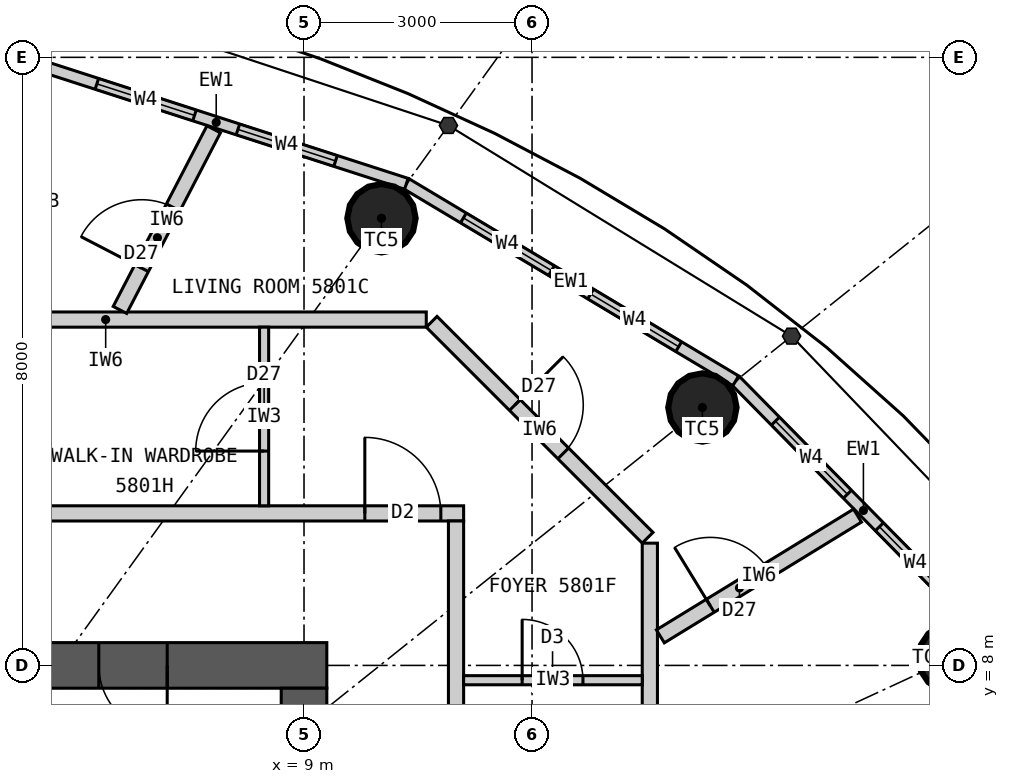
"""IFC4 building model, lengths in metres.
Left out: names, types, materials, properties, quantities, classifications, styles, units other than length and angle.
Written with IfcOpenShell. Run it as: python <this file> out.ifc"""

import sys

from ifc_helpers import new_model, si_unit, direction, frame, frame_2d, origin, origin_2d, place, context, subcontext, project, spatial, rectangle, circle, extrude, element, fill, save


model = new_model("IFC4")
c1 = context("Model", 3, precision=1e-05, world=origin(), true_north=direction((0.0, 1.0)))
c2 = subcontext(c1, "Body", "Model", "MODEL_VIEW")
j1 = project(units=[si_unit("LENGTHUNIT", "METRE"), si_unit("PLANEANGLEUNIT", "RADIAN")], contexts=[c1])
p1 = place(None, origin())
s1 = spatial("IfcSite", under=j1, at=p1, CompositionType="ELEMENT")
p2 = place(p1, origin())
s2 = spatial("IfcBuilding", under=s1, at=p2, CompositionType="ELEMENT")
p3 = place(p2, frame((0.0, 0.0, 216.0)))
s3 = spatial("IfcBuildingStorey", under=s2, at=p3, CompositionType="ELEMENT", Elevation=216.0)
for number, where, z_axis, x_axis in (
    (1, (17.532, 8.098, 0.0), (0.0, 0.0, 1.0), (1.0, 0.0, 0.0)),
    (2, (14.241, 11.393, 0.0), (0.0, 0.0, 1.0), (1.0, 0.0, 0.0)),
    (3, (10.019, 13.883, 0.0), (0.0, 0.0, 1.0), (1.0, 0.0, 0.0)),
):
    element("IfcColumn", number, at=place(p3, frame(where, z_axis=z_axis, x_axis=x_axis)), inside=s3, PredefinedType="COLUMN", context=c2, shape_type="SweptSolid", body=[
        extrude(circle(Radius=0.45, at=origin_2d()), origin(), (0.0, 0.0, 1.0), 3.3),
    ])
p4 = place(p3, frame((-9.3, 8.0, 0.0), z_axis=(0.0, 0.0, 1.0), x_axis=(1.0, 0.0, 0.0)))
e4 = element("IfcWall", 4, at=p4, inside=s3, PredefinedType="SHEAR", context=c2, shape_type="SweptSolid", body=[
    extrude(rectangle(XDim=18.6, YDim=0.6, at=frame_2d((9.3, 0.0))), origin(), (0.0, 0.0, 1.0), 3.3),
])
p5 = place(p4, frame((8.0, 0.0, 0.0)))
e5 = element("IfcOpeningElement", 5, at=p5, cuts=e4, PredefinedType="OPENING", context=c2, shape_type="SweptSolid", body=[
    extrude(rectangle(XDim=1.2, YDim=2.2, at=frame_2d((0.6, 1.1))), frame((0.0, 0.31, 0.0), z_axis=(0.0, -1.0, 0.0), x_axis=(1.0, 0.0, 0.0)), (0.0, 0.0, 1.0), 0.62),
])
p6 = place(p4, frame((15.6, 0.0, 0.0)))
e6 = element("IfcOpeningElement", 6, at=p6, cuts=e4, PredefinedType="OPENING", context=c2, shape_type="SweptSolid", body=[
    extrude(rectangle(XDim=0.9, YDim=2.2, at=frame_2d((0.45, 1.1))), frame((0.0, 0.31, 0.0), z_axis=(0.0, -1.0, 0.0), x_axis=(1.0, 0.0, 0.0)), (0.0, 0.0, 1.0), 0.62),
])
p7 = place(p3, frame((9.0, -7.7, 0.0), z_axis=(0.0, 0.0, 1.0), x_axis=(0.0, 1.0, 0.0)))
e7 = element("IfcWall", 7, at=p7, inside=s3, PredefinedType="SHEAR", context=c2, shape_type="SweptSolid", body=[
    extrude(rectangle(XDim=15.4, YDim=0.6, at=frame_2d((7.7, 0.0))), origin(), (0.0, 0.0, 1.0), 3.3),
])
p8 = place(p7, frame((6.8, 0.0, 0.0)))
e8 = element("IfcOpeningElement", 8, at=p8, cuts=e7, PredefinedType="OPENING", context=c2, shape_type="SweptSolid", body=[
    extrude(rectangle(XDim=1.8, YDim=2.2, at=frame_2d((0.9, 1.1))), frame((0.0, 0.31, 0.0), z_axis=(0.0, -1.0, 0.0), x_axis=(1.0, 0.0, 0.0)), (0.0, 0.0, 1.0), 0.62),
])
p9 = place(p3, frame((18.04, 8.332, 0.0), z_axis=(0.0, 0.0, 1.0), x_axis=(-0.701527379618, 0.712642501993, 0.0)))
e9 = element("IfcWall", 9, at=p9, inside=s3, PredefinedType="ELEMENTEDWALL", context=c2, shape_type="SweptSolid", body=[
    extrude(rectangle(XDim=4.788, YDim=0.15, at=frame_2d((2.394, 0.0))), origin(), (0.0, 0.0, 1.0), 3.12),
])
p10 = place(p9, frame((0.744, 0.0, 0.9)))
e10 = element("IfcOpeningElement", 10, at=p10, cuts=e9, PredefinedType="OPENING", context=c2, shape_type="SweptSolid", body=[
    extrude(rectangle(XDim=1.35, YDim=1.9, at=frame_2d((0.675, 0.95))), frame((0.0, 0.085, 0.0), z_axis=(0.0, -1.0, 0.0), x_axis=(1.0, 0.0, 0.0)), (0.0, 0.0, 1.0), 0.17),
])
p11 = place(p9, frame((2.694, 0.0, 0.9)))
e11 = element("IfcOpeningElement", 11, at=p11, cuts=e9, PredefinedType="OPENING", context=c2, shape_type="SweptSolid", body=[
    extrude(rectangle(XDim=1.35, YDim=1.9, at=frame_2d((0.675, 0.95))), frame((0.0, 0.085, 0.0), z_axis=(0.0, -1.0, 0.0), x_axis=(1.0, 0.0, 0.0)), (0.0, 0.0, 1.0), 0.17),
])
p12 = place(p3, frame((14.68, 11.744, 0.0), z_axis=(0.0, 0.0, 1.0), x_axis=(-0.85822150553, 0.513279502265, 0.0)))
e12 = element("IfcWall", 12, at=p12, inside=s3, PredefinedType="ELEMENTEDWALL", context=c2, shape_type="SweptSolid", body=[
    extrude(rectangle(XDim=5.05, YDim=0.15, at=frame_2d((2.525, 0.0))), origin(), (0.0, 0.0, 1.0), 3.12),
])
p13 = place(p12, frame((0.875, 0.0, 0.9)))
e13 = element("IfcOpeningElement", 13, at=p13, cuts=e12, PredefinedType="OPENING", context=c2, shape_type="SweptSolid", body=[
    extrude(rectangle(XDim=1.35, YDim=1.9, at=frame_2d((0.675, 0.95))), frame((0.0, 0.085, 0.0), z_axis=(0.0, -1.0, 0.0), x_axis=(1.0, 0.0, 0.0)), (0.0, 0.0, 1.0), 0.17),
])
p14 = place(p12, frame((2.825, 0.0, 0.9)))
e14 = element("IfcOpeningElement", 14, at=p14, cuts=e12, PredefinedType="OPENING", context=c2, shape_type="SweptSolid", body=[
    extrude(rectangle(XDim=1.35, YDim=1.9, at=frame_2d((0.675, 0.95))), frame((0.0, 0.085, 0.0), z_axis=(0.0, -1.0, 0.0), x_axis=(1.0, 0.0, 0.0)), (0.0, 0.0, 1.0), 0.17),
])
p15 = place(p3, frame((10.346, 14.336, 0.0), z_axis=(0.0, 0.0, 1.0), x_axis=(-0.951644702515, 0.307200846638, 0.0)))
e15 = element("IfcWall", 15, at=p15, inside=s3, PredefinedType="ELEMENTEDWALL", context=c2, shape_type="SweptSolid", body=[
    extrude(rectangle(XDim=5.258, YDim=0.15, at=frame_2d((2.629, 0.0))), origin(), (0.0, 0.0, 1.0), 3.12),
])
p16 = place(p15, frame((0.979, 0.0, 0.9)))
e16 = element("IfcOpeningElement", 16, at=p16, cuts=e15, PredefinedType="OPENING", context=c2, shape_type="SweptSolid", body=[
    extrude(rectangle(XDim=1.35, YDim=1.9, at=frame_2d((0.675, 0.95))), frame((0.0, 0.085, 0.0), z_axis=(0.0, -1.0, 0.0), x_axis=(1.0, 0.0, 0.0)), (0.0, 0.0, 1.0), 0.17),
])
p17 = place(p15, frame((2.929, 0.0, 0.9)))
e17 = element("IfcOpeningElement", 17, at=p17, cuts=e15, PredefinedType="OPENING", context=c2, shape_type="SweptSolid", body=[
    extrude(rectangle(XDim=1.35, YDim=1.9, at=frame_2d((0.675, 0.95))), frame((0.0, 0.085, 0.0), z_axis=(0.0, -1.0, 0.0), x_axis=(1.0, 0.0, 0.0)), (0.0, 0.0, 1.0), 0.17),
])
p18 = place(p3, frame((-11.1, 10.0, 0.0), z_axis=(0.0, 0.0, 1.0), x_axis=(1.0, 0.0, 0.0)))
e18 = element("IfcWall", 18, at=p18, inside=s3, PredefinedType="PARTITIONING", context=c2, shape_type="SweptSolid", body=[
    extrude(rectangle(XDim=22.2, YDim=0.2, at=frame_2d((11.1, 0.0))), origin(), (0.0, 0.0, 1.0), 3.12),
])
p19 = place(p18, frame((20.9, 0.0, 0.0)))
e19 = element("IfcOpeningElement", 19, at=p19, cuts=e18, PredefinedType="OPENING", context=c2, shape_type="SweptSolid", body=[
    extrude(rectangle(XDim=1.0, YDim=2.2, at=frame_2d((0.5, 1.1))), frame((0.0, 0.11, 0.0), z_axis=(0.0, -1.0, 0.0), x_axis=(1.0, 0.0, 0.0)), (0.0, 0.0, 1.0), 0.22),
])
p20 = place(p18, frame((2.82, 0.0, 0.0)))
e20 = element("IfcOpeningElement", 20, at=p20, cuts=e18, PredefinedType="OPENING", context=c2, shape_type="SweptSolid", body=[
    extrude(rectangle(XDim=1.0, YDim=2.2, at=frame_2d((0.5, 1.1))), frame((0.0, 0.11, 0.0), z_axis=(0.0, -1.0, 0.0), x_axis=(1.0, 0.0, 0.0)), (0.0, 0.0, 1.0), 0.22),
])
p21 = place(p3, frame((11.0, -0.464, 0.0), z_axis=(0.0, 0.0, 1.0), x_axis=(0.0, 1.0, 0.0)))
e21 = element("IfcWall", 21, at=p21, inside=s3, PredefinedType="PARTITIONING", context=c2, shape_type="SweptSolid", body=[
    extrude(rectangle(XDim=10.364, YDim=0.2, at=frame_2d((5.182, 0.0))), origin(), (0.0, 0.0, 1.0), 3.12),
])
p22 = place(p3, frame((13.55, 4.6, 0.0), z_axis=(0.0, 0.0, 1.0), x_axis=(0.0, 1.0, 0.0)))
e22 = element("IfcWall", 22, at=p22, inside=s3, PredefinedType="PARTITIONING", context=c2, shape_type="SweptSolid", body=[
    extrude(rectangle(XDim=5.009, YDim=0.2, at=frame_2d((2.504, 0.0))), origin(), (0.0, 0.0, 1.0), 3.12),
])
p23 = place(p22, frame((0.724, 0.0, 0.0)))
e23 = element("IfcOpeningElement", 23, at=p23, cuts=e22, PredefinedType="OPENING", context=c2, shape_type="SweptSolid", body=[
    extrude(rectangle(XDim=0.8, YDim=2.1, at=frame_2d((0.4, 1.05))), frame((0.0, 0.11, 0.0), z_axis=(0.0, -1.0, 0.0), x_axis=(1.0, 0.0, 0.0)), (0.0, 0.0, 1.0), 0.22),
])
p24 = place(p3, frame((13.521, 9.679, 0.0), z_axis=(0.0, 0.0, 1.0), x_axis=(-0.707106781187, 0.707106781187, 0.0)))
e24 = element("IfcWall", 24, at=p24, inside=s3, PredefinedType="PARTITIONING", context=c2, shape_type="SweptSolid", body=[
    extrude(rectangle(XDim=4.019, YDim=0.2, at=frame_2d((2.009, 0.0))), origin(), (0.0, 0.0, 1.0), 3.12),
])
p25 = place(p24, frame((1.57, 0.0, 0.0)))
e25 = element("IfcOpeningElement", 25, at=p25, cuts=e24, PredefinedType="OPENING", context=c2, shape_type="SweptSolid", body=[
    extrude(rectangle(XDim=0.9, YDim=2.1, at=frame_2d((0.45, 1.05))), frame((0.0, 0.11, 0.0), z_axis=(0.0, -1.0, 0.0), x_axis=(1.0, 0.0, 0.0)), (0.0, 0.0, 1.0), 0.22),
])
p26 = place(p3, frame((10.609, 12.55, 0.0), z_axis=(0.0, 0.0, 1.0), x_axis=(-1.0, 0.0, 0.0)))
e26 = element("IfcWall", 26, at=p26, inside=s3, PredefinedType="PARTITIONING", context=c2, shape_type="SweptSolid", body=[
    extrude(rectangle(XDim=8.437, YDim=0.2, at=frame_2d((4.218, 0.0))), origin(), (0.0, 0.0, 1.0), 3.12),
])
p27 = place(p26, frame((5.376, 0.0, 0.0)))
e27 = element("IfcOpeningElement", 27, at=p27, cuts=e26, PredefinedType="OPENING", context=c2, shape_type="SweptSolid", body=[
    extrude(rectangle(XDim=0.8, YDim=2.1, at=frame_2d((0.4, 1.05))), frame((0.0, 0.11, 0.0), z_axis=(0.0, -1.0, 0.0), x_axis=(1.0, 0.0, 0.0)), (0.0, 0.0, 1.0), 0.22),
])
p28 = place(p3, frame((13.688, 8.382, 0.0), z_axis=(0.0, 0.0, 1.0), x_axis=(0.852783459586, 0.522264656144, 0.0)))
e28 = element("IfcWall", 28, at=p28, inside=s3, PredefinedType="PARTITIONING", context=c2, shape_type="SweptSolid", body=[
    extrude(rectangle(XDim=3.042, YDim=0.2, at=frame_2d((1.521, 0.0))), origin(), (0.0, 0.0, 1.0), 3.12),
])
p29 = place(p28, frame((0.77, 0.0, 0.0)))
e29 = element("IfcOpeningElement", 29, at=p29, cuts=e28, PredefinedType="OPENING", context=c2, shape_type="SweptSolid", body=[
    extrude(rectangle(XDim=0.9, YDim=2.1, at=frame_2d((0.45, 1.05))), frame((0.0, 0.11, 0.0), z_axis=(0.0, -1.0, 0.0), x_axis=(1.0, 0.0, 0.0)), (0.0, 0.0, 1.0), 0.22),
])
p30 = place(p3, frame((6.578, 12.677, 0.0), z_axis=(0.0, 0.0, 1.0), x_axis=(0.460620531465, 0.887597164255, 0.0)))
e30 = element("IfcWall", 30, at=p30, inside=s3, PredefinedType="PARTITIONING", context=c2, shape_type="SweptSolid", body=[
    extrude(rectangle(XDim=2.678, YDim=0.2, at=frame_2d((1.339, 0.0))), origin(), (0.0, 0.0, 1.0), 3.12),
])
p31 = place(p30, frame((0.62, 0.0, 0.0)))
e31 = element("IfcOpeningElement", 31, at=p31, cuts=e30, PredefinedType="OPENING", context=c2, shape_type="SweptSolid", body=[
    extrude(rectangle(XDim=0.9, YDim=2.1, at=frame_2d((0.45, 1.05))), frame((0.0, 0.11, 0.0), z_axis=(0.0, -1.0, 0.0), x_axis=(1.0, 0.0, 0.0)), (0.0, 0.0, 1.0), 0.22),
])
p32 = place(p3, frame((11.1, 7.805, 0.0), z_axis=(0.0, 0.0, 1.0), x_axis=(1.0, 0.0, 0.0)))
e32 = element("IfcWall", 32, at=p32, inside=s3, PredefinedType="PARTITIONING", context=c2, shape_type="SweptSolid", body=[
    extrude(rectangle(XDim=2.35, YDim=0.12, at=frame_2d((1.175, 0.0))), origin(), (0.0, 0.0, 1.0), 3.12),
])
p33 = place(p32, frame((0.77, 0.0, 0.0)))
e33 = element("IfcOpeningElement", 33, at=p33, cuts=e32, PredefinedType="OPENING", context=c2, shape_type="SweptSolid", body=[
    extrude(rectangle(XDim=0.8, YDim=2.1, at=frame_2d((0.4, 1.05))), frame((0.0, 0.07, 0.0), z_axis=(0.0, -1.0, 0.0), x_axis=(1.0, 0.0, 0.0)), (0.0, 0.0, 1.0), 0.14),
])
p34 = place(p3, frame((8.475, 10.1, 0.0), z_axis=(0.0, 0.0, 1.0), x_axis=(0.0, 1.0, 0.0)))
e34 = element("IfcWall", 34, at=p34, inside=s3, PredefinedType="PARTITIONING", context=c2, shape_type="SweptSolid", body=[
    extrude(rectangle(XDim=2.35, YDim=0.12, at=frame_2d((1.175, 0.0))), origin(), (0.0, 0.0, 1.0), 3.12),
])
p35 = place(p34, frame((0.72, 0.0, 0.0)))
e35 = element("IfcOpeningElement", 35, at=p35, cuts=e34, PredefinedType="OPENING", context=c2, shape_type="SweptSolid", body=[
    extrude(rectangle(XDim=0.9, YDim=2.1, at=frame_2d((0.45, 1.05))), frame((0.0, 0.07, 0.0), z_axis=(0.0, -1.0, 0.0), x_axis=(1.0, 0.0, 0.0)), (0.0, 0.0, 1.0), 0.14),
])
p36 = place(p10, origin())
e36 = element("IfcWindow", 36, at=p36, inside=s3, PartitioningType="SINGLE_PANEL", PredefinedType="WINDOW", context=c2, shape_type="SweptSolid", body=[
    extrude(rectangle(XDim=1.35, YDim=1.9, at=frame_2d((0.675, 0.95))), frame((0.0, 0.03, 0.0), z_axis=(0.0, -1.0, 0.0), x_axis=(1.0, 0.0, 0.0)), (0.0, 0.0, 1.0), 0.06),
])
fill(e10, e36)
p37 = place(p11, origin())
e37 = element("IfcWindow", 37, at=p37, inside=s3, PartitioningType="SINGLE_PANEL", PredefinedType="WINDOW", context=c2, shape_type="SweptSolid", body=[
    extrude(rectangle(XDim=1.35, YDim=1.9, at=frame_2d((0.675, 0.95))), frame((0.0, 0.03, 0.0), z_axis=(0.0, -1.0, 0.0), x_axis=(1.0, 0.0, 0.0)), (0.0, 0.0, 1.0), 0.06),
])
fill(e11, e37)
p38 = place(p13, origin())
e38 = element("IfcWindow", 38, at=p38, inside=s3, PartitioningType="SINGLE_PANEL", PredefinedType="WINDOW", context=c2, shape_type="SweptSolid", body=[
    extrude(rectangle(XDim=1.35, YDim=1.9, at=frame_2d((0.675, 0.95))), frame((0.0, 0.03, 0.0), z_axis=(0.0, -1.0, 0.0), x_axis=(1.0, 0.0, 0.0)), (0.0, 0.0, 1.0), 0.06),
])
fill(e13, e38)
p39 = place(p14, origin())
e39 = element("IfcWindow", 39, at=p39, inside=s3, PartitioningType="SINGLE_PANEL", PredefinedType="WINDOW", context=c2, shape_type="SweptSolid", body=[
    extrude(rectangle(XDim=1.35, YDim=1.9, at=frame_2d((0.675, 0.95))), frame((0.0, 0.03, 0.0), z_axis=(0.0, -1.0, 0.0), x_axis=(1.0, 0.0, 0.0)), (0.0, 0.0, 1.0), 0.06),
])
fill(e14, e39)
p40 = place(p16, origin())
e40 = element("IfcWindow", 40, at=p40, inside=s3, PartitioningType="SINGLE_PANEL", PredefinedType="WINDOW", context=c2, shape_type="SweptSolid", body=[
    extrude(rectangle(XDim=1.35, YDim=1.9, at=frame_2d((0.675, 0.95))), frame((0.0, 0.03, 0.0), z_axis=(0.0, -1.0, 0.0), x_axis=(1.0, 0.0, 0.0)), (0.0, 0.0, 1.0), 0.06),
])
fill(e16, e40)
p41 = place(p17, origin())
e41 = element("IfcWindow", 41, at=p41, inside=s3, PartitioningType="SINGLE_PANEL", PredefinedType="WINDOW", context=c2, shape_type="SweptSolid", body=[
    extrude(rectangle(XDim=1.35, YDim=1.9, at=frame_2d((0.675, 0.95))), frame((0.0, 0.03, 0.0), z_axis=(0.0, -1.0, 0.0), x_axis=(1.0, 0.0, 0.0)), (0.0, 0.0, 1.0), 0.06),
])
fill(e17, e41)
p42 = place(p19, origin())
e42 = element("IfcDoor", 42, at=p42, inside=s3, OperationType="SINGLE_SWING_LEFT", PredefinedType="DOOR", context=c2, shape_type="SweptSolid", body=[
    extrude(rectangle(XDim=1.0, YDim=2.2, at=frame_2d((0.5, 1.1))), frame((0.0, 0.025, 0.0), z_axis=(0.0, -1.0, 0.0), x_axis=(1.0, 0.0, 0.0)), (0.0, 0.0, 1.0), 0.05),
])
fill(e19, e42)
p43 = place(p33, origin())
e43 = element("IfcDoor", 43, at=p43, inside=s3, OperationType="SINGLE_SWING_LEFT", PredefinedType="DOOR", context=c2, shape_type="SweptSolid", body=[
    extrude(rectangle(XDim=0.8, YDim=2.1, at=frame_2d((0.4, 1.05))), frame((0.0, 0.025, 0.0), z_axis=(0.0, -1.0, 0.0), x_axis=(1.0, 0.0, 0.0)), (0.0, 0.0, 1.0), 0.05),
])
fill(e33, e43)
p44 = place(p35, origin())
e44 = element("IfcDoor", 44, at=p44, inside=s3, OperationType="SINGLE_SWING_LEFT", PredefinedType="DOOR", context=c2, shape_type="SweptSolid", body=[
    extrude(rectangle(XDim=0.9, YDim=2.1, at=frame_2d((0.45, 1.05))), frame((0.0, 0.025, 0.0), z_axis=(0.0, -1.0, 0.0), x_axis=(1.0, 0.0, 0.0)), (0.0, 0.0, 1.0), 0.05),
])
fill(e35, e44)
p45 = place(p25, origin())
e45 = element("IfcDoor", 45, at=p45, inside=s3, OperationType="SINGLE_SWING_RIGHT", PredefinedType="DOOR", context=c2, shape_type="SweptSolid", body=[
    extrude(rectangle(XDim=0.9, YDim=2.1, at=frame_2d((0.45, 1.05))), frame((0.0, 0.025, 0.0), z_axis=(0.0, -1.0, 0.0), x_axis=(1.0, 0.0, 0.0)), (0.0, 0.0, 1.0), 0.05),
])
fill(e25, e45)
p46 = place(p29, origin())
e46 = element("IfcDoor", 46, at=p46, inside=s3, OperationType="SINGLE_SWING_LEFT", PredefinedType="DOOR", context=c2, shape_type="SweptSolid", body=[
    extrude(rectangle(XDim=0.9, YDim=2.1, at=frame_2d((0.45, 1.05))), frame((0.0, 0.025, 0.0), z_axis=(0.0, -1.0, 0.0), x_axis=(1.0, 0.0, 0.0)), (0.0, 0.0, 1.0), 0.05),
])
fill(e29, e46)
p47 = place(p31, origin())
e47 = element("IfcDoor", 47, at=p47, inside=s3, OperationType="SINGLE_SWING_LEFT", PredefinedType="DOOR", context=c2, shape_type="SweptSolid", body=[
    extrude(rectangle(XDim=0.9, YDim=2.1, at=frame_2d((0.45, 1.05))), frame((0.0, 0.025, 0.0), z_axis=(0.0, -1.0, 0.0), x_axis=(1.0, 0.0, 0.0)), (0.0, 0.0, 1.0), 0.05),
])
fill(e31, e47)
p48 = place(p6, origin())
e48 = element("IfcDoor", 48, at=p48, inside=s3, OperationType="SINGLE_SWING_RIGHT", PredefinedType="DOOR", context=c2, shape_type="SweptSolid", body=[
    extrude(rectangle(XDim=0.9, YDim=2.2, at=frame_2d((0.45, 1.1))), frame((0.0, 0.025, 0.0), z_axis=(0.0, -1.0, 0.0), x_axis=(1.0, 0.0, 0.0)), (0.0, 0.0, 1.0), 0.05),
])
fill(e6, e48)
save(model, sys.argv[1])
